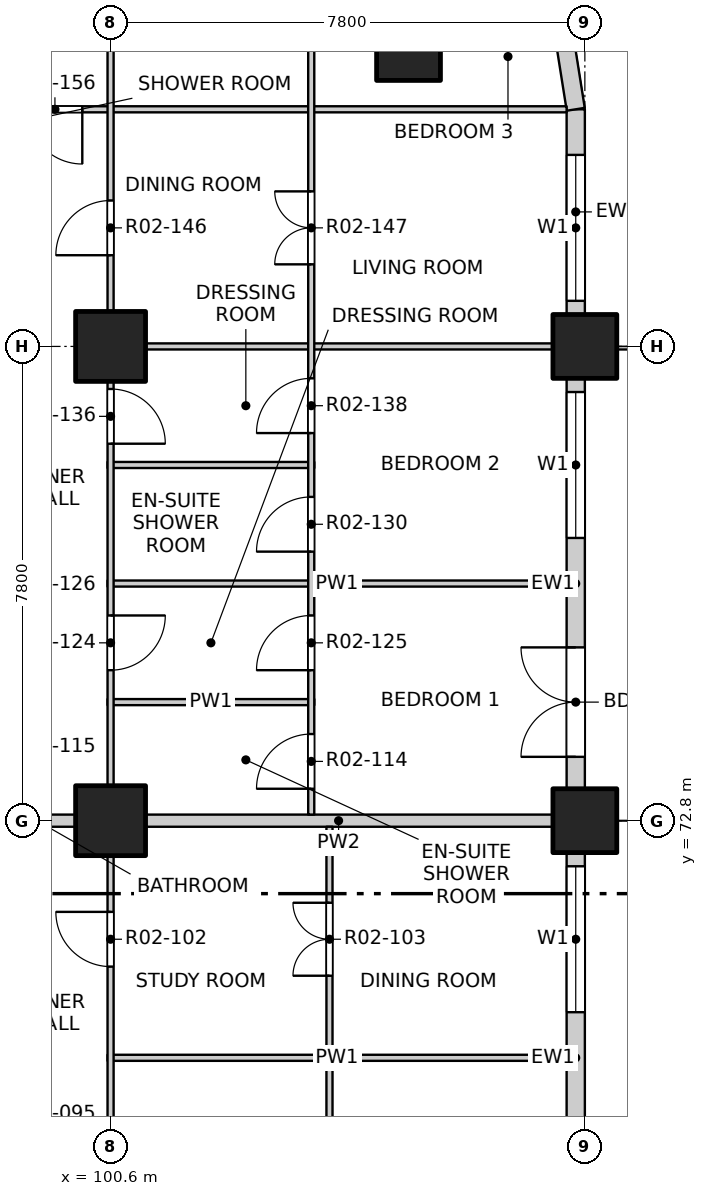
"""IFC4 building model, lengths in metres.
Left out: names, types, materials, properties, quantities, classifications, styles, units other than length and angle.
Written with IfcOpenShell. Run it as: python <this file> out.ifc"""

import sys

from ifc_helpers import new_model, si_unit, direction, frame, frame_2d, origin, origin_2d, place, context, subcontext, project, spatial, rectangle, extrude, element, fill, save


model = new_model("IFC4")
c1 = context("Model", 3, precision=1e-05, world=origin(), true_north=direction((0.0, 1.0)))
c2 = subcontext(c1, "Body", "Model", "MODEL_VIEW")
j1 = project(units=[si_unit("LENGTHUNIT", "METRE"), si_unit("PLANEANGLEUNIT", "RADIAN")], contexts=[c1])
p1 = place(None, origin())
s1 = spatial("IfcSite", under=j1, at=p1, CompositionType="ELEMENT")
p2 = place(p1, origin())
s2 = spatial("IfcBuilding", under=s1, at=p2, CompositionType="ELEMENT")
p3 = place(p2, frame((0.0, 0.0, 36.5)))
s3 = spatial("IfcBuildingStorey", under=s2, at=p3, CompositionType="ELEMENT", Elevation=36.5)
for number, where, z_axis, x_axis in (
    (1, (105.5, 85.5, -0.25), (0.0, 0.0, 1.0), (1.0, 0.0, 0.0)),
    (2, (108.4, 72.8, -0.25), (0.0, 0.0, 1.0), (1.0, 0.0, 0.0)),
    (3, (108.4, 80.6, -0.25), (0.0, 0.0, 1.0), (1.0, 0.0, 0.0)),
):
    element("IfcColumn", number, at=place(p3, frame(where, z_axis=z_axis, x_axis=x_axis)), inside=s3, PredefinedType="COLUMN", context=c2, shape_type="SweptSolid", body=[
        extrude(rectangle(XDim=1.05, YDim=1.05, at=origin_2d()), origin(), (0.0, 0.0, 1.0), 3.4),
    ])
for number, where, z_axis, x_axis in (
    (4, (100.6, 72.8, -0.25), (0.0, 0.0, 1.0), (1.0, 0.0, 0.0)),
    (5, (100.6, 80.6, -0.25), (0.0, 0.0, 1.0), (1.0, 0.0, 0.0)),
):
    element("IfcColumn", number, at=place(p3, frame(where, z_axis=z_axis, x_axis=x_axis)), inside=s3, PredefinedType="COLUMN", context=c2, shape_type="SweptSolid", body=[
        extrude(rectangle(XDim=1.15, YDim=1.15, at=origin_2d()), origin(), (0.0, 0.0, 1.0), 3.4),
    ])
p4 = place(p3, frame((108.25, 65.525, 0.0), z_axis=(0.0, 0.0, 1.0), x_axis=(0.0, 1.0, 0.0)))
e6 = element("IfcWall", 6, at=p4, inside=s3, PredefinedType="SOLIDWALL", context=c2, shape_type="SweptSolid", body=[
    extrude(rectangle(XDim=6.75, YDim=0.3, at=frame_2d((3.375, 0.0))), origin(), (0.0, 0.0, 1.0), 2.7),
])
p5 = place(p4, frame((0.525, 0.0, 0.0)))
e7 = element("IfcOpeningElement", 7, at=p5, cuts=e6, PredefinedType="OPENING", context=c2, shape_type="SweptSolid", body=[
    extrude(rectangle(XDim=1.8, YDim=2.4, at=frame_2d((0.9, 1.2))), frame((0.0, 0.16, 0.0), z_axis=(0.0, -1.0, 0.0), x_axis=(1.0, 0.0, 0.0)), (0.0, 0.0, 1.0), 0.32),
])
p6 = place(p4, frame((4.125, 0.0, 0.9)))
e8 = element("IfcOpeningElement", 8, at=p6, cuts=e6, PredefinedType="OPENING", context=c2, shape_type="SweptSolid", body=[
    extrude(rectangle(XDim=2.4, YDim=1.8, at=frame_2d((1.2, 0.9))), frame((0.0, 0.16, 0.0), z_axis=(0.0, -1.0, 0.0), x_axis=(1.0, 0.0, 0.0)), (0.0, 0.0, 1.0), 0.32),
])
p7 = place(p3, frame((108.25, 73.325, 0.0), z_axis=(0.0, 0.0, 1.0), x_axis=(0.0, 1.0, 0.0)))
e9 = element("IfcWall", 9, at=p7, inside=s3, PredefinedType="SOLIDWALL", context=c2, shape_type="SweptSolid", body=[
    extrude(rectangle(XDim=6.75, YDim=0.3, at=frame_2d((3.375, 0.0))), origin(), (0.0, 0.0, 1.0), 2.7),
])
p8 = place(p7, frame((0.525, 0.0, 0.0)))
e10 = element("IfcOpeningElement", 10, at=p8, cuts=e9, PredefinedType="OPENING", context=c2, shape_type="SweptSolid", body=[
    extrude(rectangle(XDim=1.8, YDim=2.4, at=frame_2d((0.9, 1.2))), frame((0.0, 0.16, 0.0), z_axis=(0.0, -1.0, 0.0), x_axis=(1.0, 0.0, 0.0)), (0.0, 0.0, 1.0), 0.32),
])
p9 = place(p7, frame((4.125, 0.0, 0.9)))
e11 = element("IfcOpeningElement", 11, at=p9, cuts=e9, PredefinedType="OPENING", context=c2, shape_type="SweptSolid", body=[
    extrude(rectangle(XDim=2.4, YDim=1.8, at=frame_2d((1.2, 0.9))), frame((0.0, 0.16, 0.0), z_axis=(0.0, -1.0, 0.0), x_axis=(1.0, 0.0, 0.0)), (0.0, 0.0, 1.0), 0.32),
])
p10 = place(p3, frame((108.25, 81.125, 0.0), z_axis=(0.0, 0.0, 1.0), x_axis=(0.0, 1.0, 0.0)))
e12 = element("IfcWall", 12, at=p10, inside=s3, PredefinedType="SOLIDWALL", context=c2, shape_type="SweptSolid", body=[
    extrude(rectangle(XDim=3.375, YDim=0.3, at=frame_2d((1.688, 0.0))), origin(), (0.0, 0.0, 1.0), 2.7),
])
p11 = place(p10, frame((0.225, 0.0, 0.9)))
e13 = element("IfcOpeningElement", 13, at=p11, cuts=e12, PredefinedType="OPENING", context=c2, shape_type="SweptSolid", body=[
    extrude(rectangle(XDim=2.4, YDim=1.8, at=frame_2d((1.2, 0.9))), frame((0.0, 0.16, 0.0), z_axis=(0.0, -1.0, 0.0), x_axis=(1.0, 0.0, 0.0)), (0.0, 0.0, 1.0), 0.32),
])
p12 = place(p3, frame((108.25, 84.5, 0.0), z_axis=(0.0, 0.0, 1.0), x_axis=(-0.156496880861, 0.987678452879, 0.0)))
e14 = element("IfcWall", 14, at=p12, inside=s3, PredefinedType="SOLIDWALL", context=c2, shape_type="SweptSolid", body=[
    extrude(rectangle(XDim=1.173, YDim=0.3, at=frame_2d((0.586, 0.0))), origin(), (0.0, 0.0, 1.0), 2.7),
])
p13 = place(p3, frame((100.55, 68.9, 0.0), z_axis=(0.0, 0.0, 1.0), x_axis=(1.0, 0.0, 0.0)))
e15 = element("IfcWall", 15, at=p13, inside=s3, PredefinedType="PARTITIONING", context=c2, shape_type="SweptSolid", body=[
    extrude(rectangle(XDim=7.55, YDim=0.1, at=frame_2d((3.775, 0.0))), origin(), (0.0, 0.0, 1.0), 3.15),
])
p14 = place(p3, frame((96.6, 72.8, 0.0), z_axis=(0.0, 0.0, 1.0), x_axis=(1.0, 0.0, 0.0)))
e16 = element("IfcWall", 16, at=p14, inside=s3, PredefinedType="PARTITIONING", context=c2, shape_type="SweptSolid", body=[
    extrude(rectangle(XDim=4.0, YDim=0.2, at=frame_2d((2.0, 0.0))), origin(), (0.0, 0.0, 1.0), 3.15),
])
p15 = place(p3, frame((100.6, 72.8, 0.0), z_axis=(0.0, 0.0, 1.0), x_axis=(1.0, 0.0, 0.0)))
e17 = element("IfcWall", 17, at=p15, inside=s3, PredefinedType="PARTITIONING", context=c2, shape_type="SweptSolid", body=[
    extrude(rectangle(XDim=7.5, YDim=0.2, at=frame_2d((3.75, 0.0))), origin(), (0.0, 0.0, 1.0), 2.55),
])
p16 = place(p3, frame((100.55, 74.75, 0.0), z_axis=(0.0, 0.0, 1.0), x_axis=(1.0, 0.0, 0.0)))
e18 = element("IfcWall", 18, at=p16, inside=s3, PredefinedType="PARTITIONING", context=c2, shape_type="SweptSolid", body=[
    extrude(rectangle(XDim=3.4, YDim=0.1, at=frame_2d((1.7, 0.0))), origin(), (0.0, 0.0, 1.0), 3.15),
])
p17 = place(p3, frame((100.55, 76.7, 0.0), z_axis=(0.0, 0.0, 1.0), x_axis=(1.0, 0.0, 0.0)))
e19 = element("IfcWall", 19, at=p17, inside=s3, PredefinedType="PARTITIONING", context=c2, shape_type="SweptSolid", body=[
    extrude(rectangle(XDim=7.55, YDim=0.1, at=frame_2d((3.775, 0.0))), origin(), (0.0, 0.0, 1.0), 3.15),
])
p18 = place(p3, frame((100.55, 78.65, 0.0), z_axis=(0.0, 0.0, 1.0), x_axis=(1.0, 0.0, 0.0)))
e20 = element("IfcWall", 20, at=p18, inside=s3, PredefinedType="PARTITIONING", context=c2, shape_type="SweptSolid", body=[
    extrude(rectangle(XDim=3.4, YDim=0.1, at=frame_2d((1.7, 0.0))), origin(), (0.0, 0.0, 1.0), 3.15),
])
p19 = place(p3, frame((100.55, 80.6, 0.0), z_axis=(0.0, 0.0, 1.0), x_axis=(1.0, 0.0, 0.0)))
e21 = element("IfcWall", 21, at=p19, inside=s3, PredefinedType="PARTITIONING", context=c2, shape_type="SweptSolid", body=[
    extrude(rectangle(XDim=7.55, YDim=0.1, at=frame_2d((3.775, 0.0))), origin(), (0.0, 0.0, 1.0), 2.55),
])
p20 = place(p3, frame((96.6, 84.5, 0.0), z_axis=(0.0, 0.0, 1.0), x_axis=(1.0, 0.0, 0.0)))
e22 = element("IfcWall", 22, at=p20, inside=s3, PredefinedType="PARTITIONING", context=c2, shape_type="SweptSolid", body=[
    extrude(rectangle(XDim=11.5, YDim=0.1, at=frame_2d((5.75, 0.0))), origin(), (0.0, 0.0, 1.0), 3.15),
])
p21 = place(p20, frame((2.635, 0.0, 0.0)))
e23 = element("IfcOpeningElement", 23, at=p21, cuts=e22, PredefinedType="OPENING", context=c2, shape_type="SweptSolid", body=[
    extrude(rectangle(XDim=0.9, YDim=2.1, at=frame_2d((0.45, 1.05))), frame((0.0, 0.06, 0.0), z_axis=(0.0, -1.0, 0.0), x_axis=(1.0, 0.0, 0.0)), (0.0, 0.0, 1.0), 0.12),
])
p22 = place(p3, frame((100.6, 49.4, 0.0), z_axis=(0.0, 0.0, 1.0), x_axis=(0.0, 1.0, 0.0)))
e24 = element("IfcWall", 24, at=p22, inside=s3, PredefinedType="PARTITIONING", context=c2, shape_type="SweptSolid", body=[
    extrude(rectangle(XDim=31.2, YDim=0.1, at=frame_2d((15.6, 0.0))), origin(), (0.0, 0.0, 1.0), 3.15),
])
p23 = place(p22, frame((2.475, 0.0, 0.0)))
e25 = element("IfcOpeningElement", 25, at=p23, cuts=e24, PredefinedType="OPENING", context=c2, shape_type="SweptSolid", body=[
    extrude(rectangle(XDim=0.9, YDim=2.1, at=frame_2d((0.45, 1.05))), frame((0.0, 0.06, 0.0), z_axis=(0.0, -1.0, 0.0), x_axis=(1.0, 0.0, 0.0)), (0.0, 0.0, 1.0), 0.12),
])
p24 = place(p22, frame((5.4, 0.0, 0.0)))
e26 = element("IfcOpeningElement", 26, at=p24, cuts=e24, PredefinedType="OPENING", context=c2, shape_type="SweptSolid", body=[
    extrude(rectangle(XDim=0.9, YDim=2.1, at=frame_2d((0.45, 1.05))), frame((0.0, 0.06, 0.0), z_axis=(0.0, -1.0, 0.0), x_axis=(1.0, 0.0, 0.0)), (0.0, 0.0, 1.0), 0.12),
])
p25 = place(p22, frame((10.275, 0.0, 0.0)))
e27 = element("IfcOpeningElement", 27, at=p25, cuts=e24, PredefinedType="OPENING", context=c2, shape_type="SweptSolid", body=[
    extrude(rectangle(XDim=0.9, YDim=2.1, at=frame_2d((0.45, 1.05))), frame((0.0, 0.06, 0.0), z_axis=(0.0, -1.0, 0.0), x_axis=(1.0, 0.0, 0.0)), (0.0, 0.0, 1.0), 0.12),
])
p26 = place(p22, frame((14.0, 0.0, 0.0)))
e28 = element("IfcOpeningElement", 28, at=p26, cuts=e24, PredefinedType="OPENING", context=c2, shape_type="SweptSolid", body=[
    extrude(rectangle(XDim=0.9, YDim=2.1, at=frame_2d((0.45, 1.05))), frame((0.0, 0.06, 0.0), z_axis=(0.0, -1.0, 0.0), x_axis=(1.0, 0.0, 0.0)), (0.0, 0.0, 1.0), 0.12),
])
p27 = place(p22, frame((17.1, 0.0, 0.0)))
e29 = element("IfcOpeningElement", 29, at=p27, cuts=e24, PredefinedType="OPENING", context=c2, shape_type="SweptSolid", body=[
    extrude(rectangle(XDim=0.9, YDim=2.1, at=frame_2d((0.45, 1.05))), frame((0.0, 0.06, 0.0), z_axis=(0.0, -1.0, 0.0), x_axis=(1.0, 0.0, 0.0)), (0.0, 0.0, 1.0), 0.12),
])
p28 = place(p22, frame((21.0, 0.0, 0.0)))
e30 = element("IfcOpeningElement", 30, at=p28, cuts=e24, PredefinedType="OPENING", context=c2, shape_type="SweptSolid", body=[
    extrude(rectangle(XDim=0.9, YDim=2.1, at=frame_2d((0.45, 1.05))), frame((0.0, 0.06, 0.0), z_axis=(0.0, -1.0, 0.0), x_axis=(1.0, 0.0, 0.0)), (0.0, 0.0, 1.0), 0.12),
])
p29 = place(p22, frame((25.875, 0.0, 0.0)))
e31 = element("IfcOpeningElement", 31, at=p29, cuts=e24, PredefinedType="OPENING", context=c2, shape_type="SweptSolid", body=[
    extrude(rectangle(XDim=0.9, YDim=2.1, at=frame_2d((0.45, 1.05))), frame((0.0, 0.06, 0.0), z_axis=(0.0, -1.0, 0.0), x_axis=(1.0, 0.0, 0.0)), (0.0, 0.0, 1.0), 0.12),
])
p30 = place(p22, frame((29.6, 0.0, 0.0)))
e32 = element("IfcOpeningElement", 32, at=p30, cuts=e24, PredefinedType="OPENING", context=c2, shape_type="SweptSolid", body=[
    extrude(rectangle(XDim=0.9, YDim=2.1, at=frame_2d((0.45, 1.05))), frame((0.0, 0.06, 0.0), z_axis=(0.0, -1.0, 0.0), x_axis=(1.0, 0.0, 0.0)), (0.0, 0.0, 1.0), 0.12),
])
p31 = place(p3, frame((100.6, 80.6, 0.0), z_axis=(0.0, 0.0, 1.0), x_axis=(0.0, 1.0, 0.0)))
e33 = element("IfcWall", 33, at=p31, inside=s3, PredefinedType="PARTITIONING", context=c2, shape_type="SweptSolid", body=[
    extrude(rectangle(XDim=7.5, YDim=0.1, at=frame_2d((3.75, 0.0))), origin(), (0.0, 0.0, 1.0), 2.55),
])
p32 = place(p31, frame((1.5, 0.0, 0.0)))
e34 = element("IfcOpeningElement", 34, at=p32, cuts=e33, PredefinedType="OPENING", context=c2, shape_type="SweptSolid", body=[
    extrude(rectangle(XDim=0.9, YDim=2.1, at=frame_2d((0.45, 1.05))), frame((0.0, 0.06, 0.0), z_axis=(0.0, -1.0, 0.0), x_axis=(1.0, 0.0, 0.0)), (0.0, 0.0, 1.0), 0.12),
])
p33 = place(p31, frame((5.4, 0.0, 0.0)))
e35 = element("IfcOpeningElement", 35, at=p33, cuts=e33, PredefinedType="OPENING", context=c2, shape_type="SweptSolid", body=[
    extrude(rectangle(XDim=0.9, YDim=2.1, at=frame_2d((0.45, 1.05))), frame((0.0, 0.06, 0.0), z_axis=(0.0, -1.0, 0.0), x_axis=(1.0, 0.0, 0.0)), (0.0, 0.0, 1.0), 0.12),
])
p34 = place(p3, frame((103.9, 72.9, 0.0), z_axis=(0.0, 0.0, 1.0), x_axis=(0.0, 1.0, 0.0)))
e36 = element("IfcWall", 36, at=p34, inside=s3, PredefinedType="PARTITIONING", context=c2, shape_type="SweptSolid", body=[
    extrude(rectangle(XDim=15.2, YDim=0.1, at=frame_2d((7.6, 0.0))), origin(), (0.0, 0.0, 1.0), 3.15),
])
p35 = place(p34, frame((0.425, 0.0, 0.0)))
e37 = element("IfcOpeningElement", 37, at=p35, cuts=e36, PredefinedType="OPENING", context=c2, shape_type="SweptSolid", body=[
    extrude(rectangle(XDim=0.9, YDim=2.1, at=frame_2d((0.45, 1.05))), frame((0.0, 0.06, 0.0), z_axis=(0.0, -1.0, 0.0), x_axis=(1.0, 0.0, 0.0)), (0.0, 0.0, 1.0), 0.12),
])
p36 = place(p34, frame((2.375, 0.0, 0.0)))
e38 = element("IfcOpeningElement", 38, at=p36, cuts=e36, PredefinedType="OPENING", context=c2, shape_type="SweptSolid", body=[
    extrude(rectangle(XDim=0.9, YDim=2.1, at=frame_2d((0.45, 1.05))), frame((0.0, 0.06, 0.0), z_axis=(0.0, -1.0, 0.0), x_axis=(1.0, 0.0, 0.0)), (0.0, 0.0, 1.0), 0.12),
])
p37 = place(p34, frame((4.325, 0.0, 0.0)))
e39 = element("IfcOpeningElement", 39, at=p37, cuts=e36, PredefinedType="OPENING", context=c2, shape_type="SweptSolid", body=[
    extrude(rectangle(XDim=0.9, YDim=2.1, at=frame_2d((0.45, 1.05))), frame((0.0, 0.06, 0.0), z_axis=(0.0, -1.0, 0.0), x_axis=(1.0, 0.0, 0.0)), (0.0, 0.0, 1.0), 0.12),
])
p38 = place(p34, frame((6.275, 0.0, 0.0)))
e40 = element("IfcOpeningElement", 40, at=p38, cuts=e36, PredefinedType="OPENING", context=c2, shape_type="SweptSolid", body=[
    extrude(rectangle(XDim=0.9, YDim=2.1, at=frame_2d((0.45, 1.05))), frame((0.0, 0.06, 0.0), z_axis=(0.0, -1.0, 0.0), x_axis=(1.0, 0.0, 0.0)), (0.0, 0.0, 1.0), 0.12),
])
p39 = place(p34, frame((9.05, 0.0, 0.0)))
e41 = element("IfcOpeningElement", 41, at=p39, cuts=e36, PredefinedType="OPENING", context=c2, shape_type="SweptSolid", body=[
    extrude(rectangle(XDim=1.2, YDim=2.1, at=frame_2d((0.6, 1.05))), frame((0.0, 0.06, 0.0), z_axis=(0.0, -1.0, 0.0), x_axis=(1.0, 0.0, 0.0)), (0.0, 0.0, 1.0), 0.12),
])
p40 = place(p34, frame((12.95, 0.0, 0.0)))
e42 = element("IfcOpeningElement", 42, at=p40, cuts=e36, PredefinedType="OPENING", context=c2, shape_type="SweptSolid", body=[
    extrude(rectangle(XDim=1.2, YDim=2.1, at=frame_2d((0.6, 1.05))), frame((0.0, 0.06, 0.0), z_axis=(0.0, -1.0, 0.0), x_axis=(1.0, 0.0, 0.0)), (0.0, 0.0, 1.0), 0.12),
])
p41 = place(p3, frame((104.2, 61.2, 0.0), z_axis=(0.0, 0.0, 1.0), x_axis=(0.0, 1.0, 0.0)))
e43 = element("IfcWall", 43, at=p41, inside=s3, PredefinedType="PARTITIONING", context=c2, shape_type="SweptSolid", body=[
    extrude(rectangle(XDim=11.5, YDim=0.1, at=frame_2d((5.75, 0.0))), origin(), (0.0, 0.0, 1.0), 3.15),
])
p42 = place(p41, frame((0.425, 0.0, 0.0)))
e44 = element("IfcOpeningElement", 44, at=p42, cuts=e43, PredefinedType="OPENING", context=c2, shape_type="SweptSolid", body=[
    extrude(rectangle(XDim=0.9, YDim=2.1, at=frame_2d((0.45, 1.05))), frame((0.0, 0.06, 0.0), z_axis=(0.0, -1.0, 0.0), x_axis=(1.0, 0.0, 0.0)), (0.0, 0.0, 1.0), 0.12),
])
p43 = place(p41, frame((2.375, 0.0, 0.0)))
e45 = element("IfcOpeningElement", 45, at=p43, cuts=e43, PredefinedType="OPENING", context=c2, shape_type="SweptSolid", body=[
    extrude(rectangle(XDim=0.9, YDim=2.1, at=frame_2d((0.45, 1.05))), frame((0.0, 0.06, 0.0), z_axis=(0.0, -1.0, 0.0), x_axis=(1.0, 0.0, 0.0)), (0.0, 0.0, 1.0), 0.12),
])
p44 = place(p41, frame((5.15, 0.0, 0.0)))
e46 = element("IfcOpeningElement", 46, at=p44, cuts=e43, PredefinedType="OPENING", context=c2, shape_type="SweptSolid", body=[
    extrude(rectangle(XDim=1.2, YDim=2.1, at=frame_2d((0.6, 1.05))), frame((0.0, 0.06, 0.0), z_axis=(0.0, -1.0, 0.0), x_axis=(1.0, 0.0, 0.0)), (0.0, 0.0, 1.0), 0.12),
])
p45 = place(p41, frame((9.05, 0.0, 0.0)))
e47 = element("IfcOpeningElement", 47, at=p45, cuts=e43, PredefinedType="OPENING", context=c2, shape_type="SweptSolid", body=[
    extrude(rectangle(XDim=1.2, YDim=2.1, at=frame_2d((0.6, 1.05))), frame((0.0, 0.06, 0.0), z_axis=(0.0, -1.0, 0.0), x_axis=(1.0, 0.0, 0.0)), (0.0, 0.0, 1.0), 0.12),
])
p46 = place(p6, origin())
e48 = element("IfcWindow", 48, at=p46, inside=s3, PartitioningType="DOUBLE_PANEL_VERTICAL", PredefinedType="WINDOW", context=c2, shape_type="SweptSolid", body=[
    extrude(rectangle(XDim=2.4, YDim=1.8, at=frame_2d((1.2, 0.9))), frame((0.0, 0.03, 0.0), z_axis=(0.0, -1.0, 0.0), x_axis=(1.0, 0.0, 0.0)), (0.0, 0.0, 1.0), 0.06),
])
fill(e8, e48)
p47 = place(p8, origin())
e49 = element("IfcDoor", 49, at=p47, inside=s3, OperationType="DOUBLE_DOOR_SINGLE_SWING", PredefinedType="DOOR", context=c2, shape_type="SweptSolid", body=[
    extrude(rectangle(XDim=1.8, YDim=2.4, at=frame_2d((0.9, 1.2))), frame((0.0, 0.025, 0.0), z_axis=(0.0, -1.0, 0.0), x_axis=(1.0, 0.0, 0.0)), (0.0, 0.0, 1.0), 0.05),
])
fill(e10, e49)
p48 = place(p9, origin())
e50 = element("IfcWindow", 50, at=p48, inside=s3, PartitioningType="DOUBLE_PANEL_VERTICAL", PredefinedType="WINDOW", context=c2, shape_type="SweptSolid", body=[
    extrude(rectangle(XDim=2.4, YDim=1.8, at=frame_2d((1.2, 0.9))), frame((0.0, 0.03, 0.0), z_axis=(0.0, -1.0, 0.0), x_axis=(1.0, 0.0, 0.0)), (0.0, 0.0, 1.0), 0.06),
])
fill(e11, e50)
p49 = place(p11, origin())
e51 = element("IfcWindow", 51, at=p49, inside=s3, PartitioningType="DOUBLE_PANEL_VERTICAL", PredefinedType="WINDOW", context=c2, shape_type="SweptSolid", body=[
    extrude(rectangle(XDim=2.4, YDim=1.8, at=frame_2d((1.2, 0.9))), frame((0.0, 0.03, 0.0), z_axis=(0.0, -1.0, 0.0), x_axis=(1.0, 0.0, 0.0)), (0.0, 0.0, 1.0), 0.06),
])
fill(e13, e51)
p50 = place(p28, origin())
e52 = element("IfcDoor", 52, at=p50, inside=s3, OperationType="SINGLE_SWING_RIGHT", PredefinedType="DOOR", context=c2, shape_type="SweptSolid", body=[
    extrude(rectangle(XDim=0.9, YDim=2.1, at=frame_2d((0.45, 1.05))), frame((0.0, 0.025, 0.0), z_axis=(0.0, -1.0, 0.0), x_axis=(1.0, 0.0, 0.0)), (0.0, 0.0, 1.0), 0.05),
])
fill(e30, e52)
p51 = place(p45, origin())
e53 = element("IfcDoor", 53, at=p51, inside=s3, OperationType="DOUBLE_DOOR_SINGLE_SWING", PredefinedType="DOOR", context=c2, shape_type="SweptSolid", body=[
    extrude(rectangle(XDim=1.2, YDim=2.1, at=frame_2d((0.6, 1.05))), frame((0.0, 0.025, 0.0), z_axis=(0.0, -1.0, 0.0), x_axis=(1.0, 0.0, 0.0)), (0.0, 0.0, 1.0), 0.05),
])
fill(e47, e53)
p52 = place(p35, origin())
e54 = element("IfcDoor", 54, at=p52, inside=s3, OperationType="SINGLE_SWING_LEFT", PredefinedType="DOOR", context=c2, shape_type="SweptSolid", body=[
    extrude(rectangle(XDim=0.9, YDim=2.1, at=frame_2d((0.45, 1.05))), frame((0.0, 0.025, 0.0), z_axis=(0.0, -1.0, 0.0), x_axis=(1.0, 0.0, 0.0)), (0.0, 0.0, 1.0), 0.05),
])
fill(e37, e54)
p53 = place(p29, origin())
e55 = element("IfcDoor", 55, at=p53, inside=s3, OperationType="SINGLE_SWING_LEFT", PredefinedType="DOOR", context=c2, shape_type="SweptSolid", body=[
    extrude(rectangle(XDim=0.9, YDim=2.1, at=frame_2d((0.45, 1.05))), frame((0.0, 0.025, 0.0), z_axis=(0.0, -1.0, 0.0), x_axis=(1.0, 0.0, 0.0)), (0.0, 0.0, 1.0), 0.05),
])
fill(e31, e55)
p54 = place(p36, origin())
e56 = element("IfcDoor", 56, at=p54, inside=s3, OperationType="SINGLE_SWING_LEFT", PredefinedType="DOOR", context=c2, shape_type="SweptSolid", body=[
    extrude(rectangle(XDim=0.9, YDim=2.1, at=frame_2d((0.45, 1.05))), frame((0.0, 0.025, 0.0), z_axis=(0.0, -1.0, 0.0), x_axis=(1.0, 0.0, 0.0)), (0.0, 0.0, 1.0), 0.05),
])
fill(e38, e56)
p55 = place(p37, origin())
e57 = element("IfcDoor", 57, at=p55, inside=s3, OperationType="SINGLE_SWING_LEFT", PredefinedType="DOOR", context=c2, shape_type="SweptSolid", body=[
    extrude(rectangle(XDim=0.9, YDim=2.1, at=frame_2d((0.45, 1.05))), frame((0.0, 0.025, 0.0), z_axis=(0.0, -1.0, 0.0), x_axis=(1.0, 0.0, 0.0)), (0.0, 0.0, 1.0), 0.05),
])
fill(e39, e57)
p56 = place(p30, origin())
e58 = element("IfcDoor", 58, at=p56, inside=s3, OperationType="SINGLE_SWING_RIGHT", PredefinedType="DOOR", context=c2, shape_type="SweptSolid", body=[
    extrude(rectangle(XDim=0.9, YDim=2.1, at=frame_2d((0.45, 1.05))), frame((0.0, 0.025, 0.0), z_axis=(0.0, -1.0, 0.0), x_axis=(1.0, 0.0, 0.0)), (0.0, 0.0, 1.0), 0.05),
])
fill(e32, e58)
p57 = place(p38, origin())
e59 = element("IfcDoor", 59, at=p57, inside=s3, OperationType="SINGLE_SWING_LEFT", PredefinedType="DOOR", context=c2, shape_type="SweptSolid", body=[
    extrude(rectangle(XDim=0.9, YDim=2.1, at=frame_2d((0.45, 1.05))), frame((0.0, 0.025, 0.0), z_axis=(0.0, -1.0, 0.0), x_axis=(1.0, 0.0, 0.0)), (0.0, 0.0, 1.0), 0.05),
])
fill(e40, e59)
p58 = place(p32, origin())
e60 = element("IfcDoor", 60, at=p58, inside=s3, OperationType="SINGLE_SWING_LEFT", PredefinedType="DOOR", context=c2, shape_type="SweptSolid", body=[
    extrude(rectangle(XDim=0.9, YDim=2.1, at=frame_2d((0.45, 1.05))), frame((0.0, 0.025, 0.0), z_axis=(0.0, -1.0, 0.0), x_axis=(1.0, 0.0, 0.0)), (0.0, 0.0, 1.0), 0.05),
])
fill(e34, e60)
p59 = place(p39, origin())
e61 = element("IfcDoor", 61, at=p59, inside=s3, OperationType="DOUBLE_DOOR_SINGLE_SWING", PredefinedType="DOOR", context=c2, shape_type="SweptSolid", body=[
    extrude(rectangle(XDim=1.2, YDim=2.1, at=frame_2d((0.6, 1.05))), frame((0.0, 0.025, 0.0), z_axis=(0.0, -1.0, 0.0), x_axis=(1.0, 0.0, 0.0)), (0.0, 0.0, 1.0), 0.05),
])
fill(e41, e61)
p60 = place(p21, origin())
e62 = element("IfcDoor", 62, at=p60, inside=s3, OperationType="SINGLE_SWING_LEFT", PredefinedType="DOOR", context=c2, shape_type="SweptSolid", body=[
    extrude(rectangle(XDim=0.9, YDim=2.1, at=frame_2d((0.45, 1.05))), frame((0.0, 0.025, 0.0), z_axis=(0.0, -1.0, 0.0), x_axis=(1.0, 0.0, 0.0)), (0.0, 0.0, 1.0), 0.05),
])
fill(e23, e62)
save(model, sys.argv[1])
